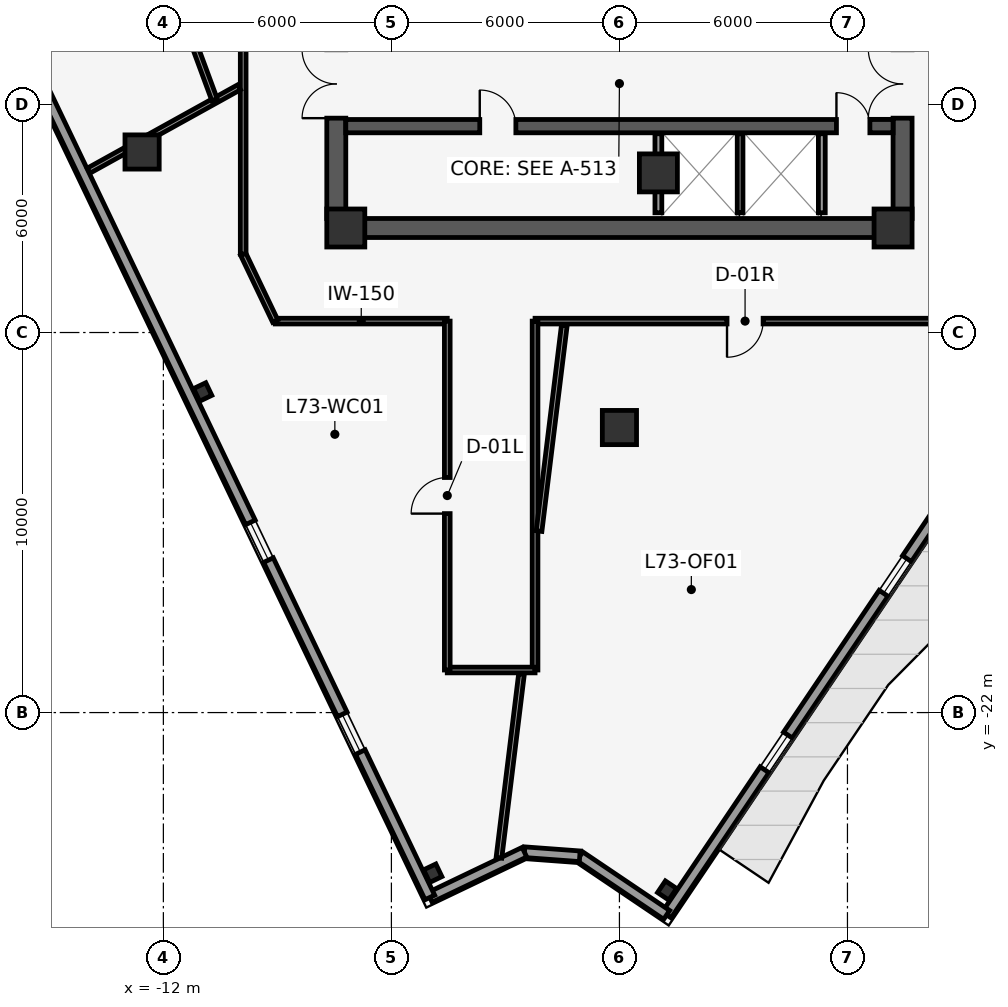
"""IFC4 building model, lengths in metres.
Left out: names, types, materials, properties, quantities, classifications, styles, units other than length and angle.
Written with IfcOpenShell. Run it as: python <this file> out.ifc"""

import sys

from ifc_helpers import new_model, si_unit, direction, frame, frame_2d, origin, origin_2d, place, context, subcontext, project, spatial, rectangle, i_section, extrude, element, fill, save


model = new_model("IFC4")
c1 = context("Model", 3, precision=1e-05, world=origin(), true_north=direction((0.0, 1.0)))
c2 = subcontext(c1, "Body", "Model", "MODEL_VIEW")
j1 = project(units=[si_unit("LENGTHUNIT", "METRE"), si_unit("PLANEANGLEUNIT", "RADIAN")], contexts=[c1])
p1 = place(None, origin())
s1 = spatial("IfcSite", under=j1, at=p1, CompositionType="ELEMENT")
p2 = place(p1, origin())
s2 = spatial("IfcBuilding", under=s1, at=p2, CompositionType="ELEMENT")
p3 = place(p2, frame((0.0, 0.0, 310.6)))
s3 = spatial("IfcBuildingStorey", under=s2, at=p3, CompositionType="ELEMENT", Elevation=310.6)
p4 = place(p3, frame((-7.45, -9.0, 0.0), z_axis=(0.0, 0.0, 1.0), x_axis=(0.0, 1.0, 0.0)))
e1 = element("IfcWall", 1, at=p4, inside=s3, PredefinedType="SHEAR", context=c2, shape_type="SweptSolid", body=[
    extrude(rectangle(XDim=9.1, YDim=0.5, at=frame_2d((4.55, 0.0))), origin(), (0.0, 0.0, 1.0), 3.85),
])
p5 = place(p4, frame((2.64, 0.0, 0.0)))
e2 = element("IfcOpeningElement", 2, at=p5, cuts=e1, PredefinedType="OPENING", context=c2, shape_type="SweptSolid", body=[
    extrude(rectangle(XDim=1.8, YDim=2.2, at=frame_2d((0.9, 1.1))), frame((0.0, 0.26, 0.0), z_axis=(0.0, -1.0, 0.0), x_axis=(1.0, 0.0, 0.0)), (0.0, 0.0, 1.0), 0.52),
])
p6 = place(p4, frame((7.55, 0.0, 0.0)))
e3 = element("IfcOpeningElement", 3, at=p6, cuts=e1, PredefinedType="OPENING", context=c2, shape_type="SweptSolid", body=[
    extrude(rectangle(XDim=1.2, YDim=2.15, at=frame_2d((0.6, 1.075))), frame((0.0, 0.26, 0.0), z_axis=(0.0, -1.0, 0.0), x_axis=(1.0, 0.0, 0.0)), (0.0, 0.0, 1.0), 0.52),
])
p7 = place(p3, frame((7.45, -9.0, 0.0), z_axis=(0.0, 0.0, 1.0), x_axis=(0.0, 1.0, 0.0)))
e4 = element("IfcWall", 4, at=p7, inside=s3, PredefinedType="SHEAR", context=c2, shape_type="SweptSolid", body=[
    extrude(rectangle(XDim=9.1, YDim=0.5, at=frame_2d((4.55, 0.0))), origin(), (0.0, 0.0, 1.0), 3.85),
])
p8 = place(p7, frame((2.64, 0.0, 0.0)))
e5 = element("IfcOpeningElement", 5, at=p8, cuts=e4, PredefinedType="OPENING", context=c2, shape_type="SweptSolid", body=[
    extrude(rectangle(XDim=1.8, YDim=2.2, at=frame_2d((0.9, 1.1))), frame((0.0, 0.26, 0.0), z_axis=(0.0, -1.0, 0.0), x_axis=(1.0, 0.0, 0.0)), (0.0, 0.0, 1.0), 0.52),
])
p9 = place(p7, frame((7.55, 0.0, 0.0)))
e6 = element("IfcOpeningElement", 6, at=p9, cuts=e4, PredefinedType="OPENING", context=c2, shape_type="SweptSolid", body=[
    extrude(rectangle(XDim=1.2, YDim=2.15, at=frame_2d((0.6, 1.075))), frame((0.0, 0.26, 0.0), z_axis=(0.0, -1.0, 0.0), x_axis=(1.0, 0.0, 0.0)), (0.0, 0.0, 1.0), 0.52),
])
p10 = place(p3, frame((-7.45, -9.25, 0.0), z_axis=(0.0, 0.0, 1.0), x_axis=(1.0, 0.0, 0.0)))
e7 = element("IfcWall", 7, at=p10, inside=s3, PredefinedType="SHEAR", context=c2, shape_type="SweptSolid", body=[
    extrude(rectangle(XDim=14.9, YDim=0.5, at=frame_2d((7.45, 0.0))), origin(), (0.0, 0.0, 1.0), 3.85),
])
p11 = place(p3, frame((-7.2, -6.57, 0.0), z_axis=(0.0, 0.0, 1.0), x_axis=(1.0, 0.0, 0.0)))
e8 = element("IfcWall", 8, at=p11, inside=s3, PredefinedType="SHEAR", context=c2, shape_type="SweptSolid", body=[
    extrude(rectangle(XDim=14.4, YDim=0.35, at=frame_2d((7.2, 0.0))), origin(), (0.0, 0.0, 1.0), 3.85),
])
p12 = place(p11, frame((3.525, 0.0, 0.0)))
e9 = element("IfcOpeningElement", 9, at=p12, cuts=e8, PredefinedType="OPENING", context=c2, shape_type="SweptSolid", body=[
    extrude(rectangle(XDim=0.95, YDim=2.15, at=frame_2d((0.475, 1.075))), frame((0.0, 0.185, 0.0), z_axis=(0.0, -1.0, 0.0), x_axis=(1.0, 0.0, 0.0)), (0.0, 0.0, 1.0), 0.37),
])
p13 = place(p11, frame((12.91, 0.0, 0.0)))
e10 = element("IfcOpeningElement", 10, at=p13, cuts=e8, PredefinedType="OPENING", context=c2, shape_type="SweptSolid", body=[
    extrude(rectangle(XDim=0.88, YDim=2.15, at=frame_2d((0.44, 1.075))), frame((0.0, 0.185, 0.0), z_axis=(0.0, -1.0, 0.0), x_axis=(1.0, 0.0, 0.0)), (0.0, 0.0, 1.0), 0.37),
])
for number, where, z_axis, x_axis in (
    (11, (-7.2, -9.25, 0.0), (0.0, 0.0, 1.0), (1.0, 0.0, 0.0)),
    (12, (7.2, -9.25, 0.0), (0.0, 0.0, 1.0), (1.0, 0.0, 0.0)),
    (13, (1.025, -7.8, 0.0), (0.0, 0.0, 1.0), (1.0, 0.0, 0.0)),
):
    element("IfcColumn", number, at=place(p3, frame(where, z_axis=z_axis, x_axis=x_axis)), inside=s3, PredefinedType="COLUMN", context=c2, shape_type="SweptSolid", body=[
        extrude(rectangle(XDim=1.0, YDim=1.0, at=origin_2d()), origin(), (0.0, 0.0, 1.0), 4.1),
    ])
for number, where, z_axis, x_axis in (
    (14, (-12.56, -7.25, 0.0), (0.0, 0.0, 1.0), (1.0, 0.0, 0.0)),
    (15, (0.0, -14.5, 0.0), (0.0, 0.0, 1.0), (1.0, 0.0, 0.0)),
):
    element("IfcColumn", number, at=place(p3, frame(where, z_axis=z_axis, x_axis=x_axis)), inside=s3, PredefinedType="COLUMN", context=c2, shape_type="SweptSolid", body=[
        extrude(rectangle(XDim=0.9, YDim=0.9, at=origin_2d()), origin(), (0.0, 0.0, 1.0), 4.1),
    ])
for number, where, z_axis, x_axis in (
    (16, (-10.966, -13.565, 0.0), (0.0, 0.0, 1.0), (-0.431, 0.902, 0.0)),
    (17, (-4.912, -26.227, 0.0), (0.0, 0.0, 1.0), (-0.431, 0.902, 0.0)),
    (18, (1.254, -26.682, 0.0), (0.0, 0.0, 1.0), (0.559, 0.829, 0.0)),
):
    element("IfcColumn", number, at=place(p3, frame(where, z_axis=z_axis, x_axis=x_axis)), inside=s3, PredefinedType="COLUMN", context=c2, shape_type="SweptSolid", body=[
        extrude(i_section(OverallWidth=0.368, OverallDepth=0.356, WebThickness=0.011, FlangeThickness=0.018, at=origin_2d()), origin(), (0.0, 0.0, 1.0), 4.1),
    ])
p14 = place(p3, frame((25.8, 9.083, 0.0), z_axis=(0.0, 0.0, 1.0), x_axis=(-0.55919392155, -0.829036885851, 0.0)))
e19 = element("IfcWall", 19, at=p14, inside=s3, PredefinedType="STANDARD", context=c2, shape_type="SweptSolid", body=[
    extrude(rectangle(XDim=43.915, YDim=0.28, at=frame_2d((21.958, 0.0))), origin(), (0.0, 0.0, 1.0), 3.85),
])
p15 = place(p14, frame((21.457, 0.0, 0.0)))
e20 = element("IfcOpeningElement", 20, at=p15, cuts=e19, PredefinedType="OPENING", context=c2, shape_type="SweptSolid", body=[
    extrude(rectangle(XDim=1.0, YDim=2.15, at=frame_2d((0.5, 1.075))), frame((0.0, 0.15, 0.0), z_axis=(0.0, -1.0, 0.0), x_axis=(1.0, 0.0, 0.0)), (0.0, 0.0, 1.0), 0.3),
])
p16 = place(p14, frame((4.607, 0.0, 0.85)))
e21 = element("IfcOpeningElement", 21, at=p16, cuts=e19, PredefinedType="OPENING", context=c2, shape_type="SweptSolid", body=[
    extrude(rectangle(XDim=1.1, YDim=2.15, at=frame_2d((0.55, 1.075))), frame((0.0, 0.15, 0.0), z_axis=(0.0, -1.0, 0.0), x_axis=(1.0, 0.0, 0.0)), (0.0, 0.0, 1.0), 0.3),
])
p17 = place(p14, frame((15.807, 0.0, 0.85)))
e22 = element("IfcOpeningElement", 22, at=p17, cuts=e19, PredefinedType="OPENING", context=c2, shape_type="SweptSolid", body=[
    extrude(rectangle(XDim=1.1, YDim=2.15, at=frame_2d((0.55, 1.075))), frame((0.0, 0.15, 0.0), z_axis=(0.0, -1.0, 0.0), x_axis=(1.0, 0.0, 0.0)), (0.0, 0.0, 1.0), 0.3),
])
p18 = place(p14, frame((27.007, 0.0, 0.85)))
e23 = element("IfcOpeningElement", 23, at=p18, cuts=e19, PredefinedType="OPENING", context=c2, shape_type="SweptSolid", body=[
    extrude(rectangle(XDim=1.1, YDim=2.15, at=frame_2d((0.55, 1.075))), frame((0.0, 0.15, 0.0), z_axis=(0.0, -1.0, 0.0), x_axis=(1.0, 0.0, 0.0)), (0.0, 0.0, 1.0), 0.3),
])
p19 = place(p14, frame((32.607, 0.0, 0.85)))
e24 = element("IfcOpeningElement", 24, at=p19, cuts=e19, PredefinedType="OPENING", context=c2, shape_type="SweptSolid", body=[
    extrude(rectangle(XDim=1.1, YDim=2.15, at=frame_2d((0.55, 1.075))), frame((0.0, 0.15, 0.0), z_axis=(0.0, -1.0, 0.0), x_axis=(1.0, 0.0, 0.0)), (0.0, 0.0, 1.0), 0.3),
])
p20 = place(p14, frame((38.207, 0.0, 0.85)))
e25 = element("IfcOpeningElement", 25, at=p20, cuts=e19, PredefinedType="OPENING", context=c2, shape_type="SweptSolid", body=[
    extrude(rectangle(XDim=1.1, YDim=2.15, at=frame_2d((0.55, 1.075))), frame((0.0, 0.15, 0.0), z_axis=(0.0, -1.0, 0.0), x_axis=(1.0, 0.0, 0.0)), (0.0, 0.0, 1.0), 0.3),
])
p21 = place(p3, frame((1.243, -27.324, 0.0), z_axis=(0.0, 0.0, 1.0), x_axis=(-0.829015842911, 0.559225117643, 0.0)))
e26 = element("IfcWall", 26, at=p21, inside=s3, PredefinedType="STANDARD", context=c2, shape_type="SweptSolid", body=[
    extrude(rectangle(XDim=2.759, YDim=0.28, at=frame_2d((1.379, 0.0))), origin(), (0.0, 0.0, 1.0), 3.85),
])
p22 = place(p3, frame((-1.044, -25.781, 0.0), z_axis=(0.0, 0.0, 1.0), x_axis=(-0.997286893261, 0.073612855735, 0.0)))
e27 = element("IfcWall", 27, at=p22, inside=s3, PredefinedType="STANDARD", context=c2, shape_type="SweptSolid", body=[
    extrude(rectangle(XDim=1.459, YDim=0.28, at=frame_2d((0.729, 0.0))), origin(), (0.0, 0.0, 1.0), 3.85),
])
p23 = place(p3, frame((-2.5, -25.674, 0.0), z_axis=(0.0, 0.0, 1.0), x_axis=(-0.902044352952, -0.431643354296, 0.0)))
e28 = element("IfcWall", 28, at=p23, inside=s3, PredefinedType="STANDARD", context=c2, shape_type="SweptSolid", body=[
    extrude(rectangle(XDim=2.759, YDim=0.28, at=frame_2d((1.379, 0.0))), origin(), (0.0, 0.0, 1.0), 3.85),
])
p24 = place(p3, frame((-4.988, -26.865, 0.0), z_axis=(0.0, 0.0, 1.0), x_axis=(-0.431592936847, 0.902068476815, 0.0)))
e29 = element("IfcWall", 29, at=p24, inside=s3, PredefinedType="STANDARD", context=c2, shape_type="SweptSolid", body=[
    extrude(rectangle(XDim=43.18, YDim=0.28, at=frame_2d((21.59, 0.0))), origin(), (0.0, 0.0, 1.0), 3.85),
])
p25 = place(p24, frame((4.24, 0.0, 0.85)))
e30 = element("IfcOpeningElement", 30, at=p25, cuts=e29, PredefinedType="OPENING", context=c2, shape_type="SweptSolid", body=[
    extrude(rectangle(XDim=1.1, YDim=2.15, at=frame_2d((0.55, 1.075))), frame((0.0, 0.15, 0.0), z_axis=(0.0, -1.0, 0.0), x_axis=(1.0, 0.0, 0.0)), (0.0, 0.0, 1.0), 0.3),
])
p26 = place(p24, frame((9.84, 0.0, 0.85)))
e31 = element("IfcOpeningElement", 31, at=p26, cuts=e29, PredefinedType="OPENING", context=c2, shape_type="SweptSolid", body=[
    extrude(rectangle(XDim=1.1, YDim=2.15, at=frame_2d((0.55, 1.075))), frame((0.0, 0.15, 0.0), z_axis=(0.0, -1.0, 0.0), x_axis=(1.0, 0.0, 0.0)), (0.0, 0.0, 1.0), 0.3),
])
p27 = place(p24, frame((32.24, 0.0, 0.85)))
e32 = element("IfcOpeningElement", 32, at=p27, cuts=e29, PredefinedType="OPENING", context=c2, shape_type="SweptSolid", body=[
    extrude(rectangle(XDim=1.1, YDim=2.15, at=frame_2d((0.55, 1.075))), frame((0.0, 0.15, 0.0), z_axis=(0.0, -1.0, 0.0), x_axis=(1.0, 0.0, 0.0)), (0.0, 0.0, 1.0), 0.3),
])
p28 = place(p24, frame((37.84, 0.0, 0.85)))
e33 = element("IfcOpeningElement", 33, at=p28, cuts=e29, PredefinedType="OPENING", context=c2, shape_type="SweptSolid", body=[
    extrude(rectangle(XDim=1.1, YDim=2.15, at=frame_2d((0.55, 1.075))), frame((0.0, 0.15, 0.0), z_axis=(0.0, -1.0, 0.0), x_axis=(1.0, 0.0, 0.0)), (0.0, 0.0, 1.0), 0.3),
])
p29 = place(p3, frame((1.025, -8.85, 0.0), z_axis=(0.0, 0.0, 1.0), x_axis=(0.0, 1.0, 0.0)))
e34 = element("IfcWall", 34, at=p29, inside=s3, PredefinedType="PARTITIONING", context=c2, shape_type="SweptSolid", body=[
    extrude(rectangle(XDim=2.08, YDim=0.18, at=frame_2d((1.04, 0.0))), origin(), (0.0, 0.0, 1.0), 2.898),
])
p30 = place(p3, frame((3.175, -8.85, 0.0), z_axis=(0.0, 0.0, 1.0), x_axis=(0.0, 1.0, 0.0)))
e35 = element("IfcWall", 35, at=p30, inside=s3, PredefinedType="PARTITIONING", context=c2, shape_type="SweptSolid", body=[
    extrude(rectangle(XDim=2.08, YDim=0.15, at=frame_2d((1.04, 0.0))), origin(), (0.0, 0.0, 1.0), 3.85),
])
p31 = place(p3, frame((5.325, -8.85, 0.0), z_axis=(0.0, 0.0, 1.0), x_axis=(0.0, 1.0, 0.0)))
e36 = element("IfcWall", 36, at=p31, inside=s3, PredefinedType="PARTITIONING", context=c2, shape_type="SweptSolid", body=[
    extrude(rectangle(XDim=2.08, YDim=0.18, at=frame_2d((1.04, 0.0))), origin(), (0.0, 0.0, 1.0), 3.85),
])
p32 = place(p3, frame((-4.53, -11.7, 0.0), z_axis=(0.0, 0.0, 1.0), x_axis=(-1.0, 0.0, 0.0)))
e37 = element("IfcWall", 37, at=p32, inside=s3, PredefinedType="PARTITIONING", context=c2, shape_type="SweptSolid", body=[
    extrude(rectangle(XDim=4.526, YDim=0.15, at=frame_2d((2.263, 0.0))), origin(), (0.0, 0.0, 1.0), 3.85),
])
p33 = place(p3, frame((-9.056, -11.7, 0.0), z_axis=(0.0, 0.0, 1.0), x_axis=(-0.431605782187, 0.902062330875, 0.0)))
e38 = element("IfcWall", 38, at=p33, inside=s3, PredefinedType="PARTITIONING", context=c2, shape_type="SweptSolid", body=[
    extrude(rectangle(XDim=1.954, YDim=0.15, at=frame_2d((0.977, 0.0))), origin(), (0.0, 0.0, 1.0), 3.85),
])
p34 = place(p3, frame((-9.9, -9.937, 0.0), z_axis=(0.0, 0.0, 1.0), x_axis=(0.0, 1.0, 0.0)))
e39 = element("IfcWall", 39, at=p34, inside=s3, PredefinedType="PARTITIONING", context=c2, shape_type="SweptSolid", body=[
    extrude(rectangle(XDim=21.787, YDim=0.15, at=frame_2d((10.894, 0.0))), origin(), (0.0, 0.0, 1.0), 3.85),
])
p35 = place(p34, frame((17.591, 0.0, 0.0)))
e40 = element("IfcOpeningElement", 40, at=p35, cuts=e39, PredefinedType="OPENING", context=c2, shape_type="SweptSolid", body=[
    extrude(rectangle(XDim=0.95, YDim=2.15, at=frame_2d((0.475, 1.075))), frame((0.0, 0.085, 0.0), z_axis=(0.0, -1.0, 0.0), x_axis=(1.0, 0.0, 0.0)), (0.0, 0.0, 1.0), 0.17),
])
p36 = place(p34, frame((9.022, 0.0, 0.0)))
e41 = element("IfcOpeningElement", 41, at=p36, cuts=e39, PredefinedType="OPENING", context=c2, shape_type="SweptSolid", body=[
    extrude(rectangle(XDim=0.95, YDim=2.15, at=frame_2d((0.475, 1.075))), frame((0.0, 0.085, 0.0), z_axis=(0.0, -1.0, 0.0), x_axis=(1.0, 0.0, 0.0)), (0.0, 0.0, 1.0), 0.17),
])
p37 = place(p3, frame((8.314, -11.7, 0.0), z_axis=(0.0, 0.0, 1.0), x_axis=(-1.0, 0.0, 0.0)))
e42 = element("IfcWall", 42, at=p37, inside=s3, PredefinedType="PARTITIONING", context=c2, shape_type="SweptSolid", body=[
    extrude(rectangle(XDim=10.534, YDim=0.15, at=frame_2d((5.267, 0.0))), origin(), (0.0, 0.0, 1.0), 3.85),
])
p38 = place(p37, frame((4.533, 0.0, 0.0)))
e43 = element("IfcOpeningElement", 43, at=p38, cuts=e42, PredefinedType="OPENING", context=c2, shape_type="SweptSolid", body=[
    extrude(rectangle(XDim=0.95, YDim=2.15, at=frame_2d((0.475, 1.075))), frame((0.0, 0.085, 0.0), z_axis=(0.0, -1.0, 0.0), x_axis=(1.0, 0.0, 0.0)), (0.0, 0.0, 1.0), 0.17),
])
p39 = place(p3, frame((-2.22, -11.7, 0.0), z_axis=(0.0, 0.0, 1.0), x_axis=(0.0, -1.0, 0.0)))
e44 = element("IfcWall", 44, at=p39, inside=s3, PredefinedType="PARTITIONING", context=c2, shape_type="SweptSolid", body=[
    extrude(rectangle(XDim=9.18, YDim=0.15, at=frame_2d((4.59, 0.0))), origin(), (0.0, 0.0, 1.0), 3.85),
])
p40 = place(p3, frame((-2.22, -20.88, 0.0), z_axis=(0.0, 0.0, 1.0), x_axis=(-1.0, 0.0, 0.0)))
e45 = element("IfcWall", 45, at=p40, inside=s3, PredefinedType="PARTITIONING", context=c2, shape_type="SweptSolid", body=[
    extrude(rectangle(XDim=2.31, YDim=0.15, at=frame_2d((1.155, 0.0))), origin(), (0.0, 0.0, 1.0), 3.85),
])
p41 = place(p3, frame((-4.53, -20.88, 0.0), z_axis=(0.0, 0.0, 1.0), x_axis=(0.0, 1.0, 0.0)))
e46 = element("IfcWall", 46, at=p41, inside=s3, PredefinedType="PARTITIONING", context=c2, shape_type="SweptSolid", body=[
    extrude(rectangle(XDim=9.18, YDim=0.15, at=frame_2d((4.59, 0.0))), origin(), (0.0, 0.0, 1.0), 3.85),
])
p42 = place(p41, frame((4.115, 0.0, 0.0)))
e47 = element("IfcOpeningElement", 47, at=p42, cuts=e46, PredefinedType="OPENING", context=c2, shape_type="SweptSolid", body=[
    extrude(rectangle(XDim=0.95, YDim=2.15, at=frame_2d((0.475, 1.075))), frame((0.0, 0.085, 0.0), z_axis=(0.0, -1.0, 0.0), x_axis=(1.0, 0.0, 0.0)), (0.0, 0.0, 1.0), 0.17),
])
p43 = place(p3, frame((-10.005, -5.546, 0.0), z_axis=(0.0, 0.0, 1.0), x_axis=(-0.874622222754, -0.48480508193, 0.0)))
e48 = element("IfcWall", 48, at=p43, inside=s3, PredefinedType="PARTITIONING", context=c2, shape_type="SweptSolid", body=[
    extrude(rectangle(XDim=4.529, YDim=0.15, at=frame_2d((2.264, 0.0))), origin(), (0.0, 0.0, 1.0), 3.85),
])
p44 = place(p3, frame((-1.449, -11.805, 0.0), z_axis=(0.0, 0.0, 1.0), x_axis=(-0.121866576679, -0.992546491349, 0.0)))
e49 = element("IfcWall", 49, at=p44, inside=s3, PredefinedType="PARTITIONING", context=c2, shape_type="SweptSolid", body=[
    extrude(rectangle(XDim=5.461, YDim=0.15, at=frame_2d((2.73, 0.0))), origin(), (0.0, 0.0, 1.0), 3.85),
])
p45 = place(p3, frame((-2.577, -20.985, 0.0), z_axis=(0.0, 0.0, 1.0), x_axis=(-0.12186446529, -0.992546750586, 0.0)))
e50 = element("IfcWall", 50, at=p45, inside=s3, PredefinedType="PARTITIONING", context=c2, shape_type="SweptSolid", body=[
    extrude(rectangle(XDim=4.874, YDim=0.15, at=frame_2d((2.437, 0.0))), origin(), (0.0, 0.0, 1.0), 3.85),
])
p46 = place(p3, frame((-15.473, 7.188, 0.0), z_axis=(0.0, 0.0, 1.0), x_axis=(0.346159492737, -0.938175679491, 0.0)))
e51 = element("IfcWall", 51, at=p46, inside=s3, PredefinedType="PARTITIONING", context=c2, shape_type="SweptSolid", body=[
    extrude(rectangle(XDim=13.925, YDim=0.15, at=frame_2d((6.962, 0.0))), origin(), (0.0, 0.0, 1.0), 3.85),
])
p47 = place(p46, frame((6.512, 0.0, 0.0)))
e52 = element("IfcOpeningElement", 52, at=p47, cuts=e51, PredefinedType="OPENING", context=c2, shape_type="SweptSolid", body=[
    extrude(rectangle(XDim=0.9, YDim=2.1, at=frame_2d((0.45, 1.05))), frame((0.0, 0.085, 0.0), z_axis=(0.0, -1.0, 0.0), x_axis=(1.0, 0.0, 0.0)), (0.0, 0.0, 1.0), 0.17),
])
p48 = place(p19, origin())
e53 = element("IfcWindow", 53, at=p48, inside=s3, PartitioningType="SINGLE_PANEL", PredefinedType="WINDOW", context=c2, shape_type="SweptSolid", body=[
    extrude(rectangle(XDim=1.1, YDim=2.15, at=frame_2d((0.55, 1.075))), frame((0.0, 0.03, 0.0), z_axis=(0.0, -1.0, 0.0), x_axis=(1.0, 0.0, 0.0)), (0.0, 0.0, 1.0), 0.06),
])
fill(e24, e53)
p49 = place(p20, origin())
e54 = element("IfcWindow", 54, at=p49, inside=s3, PartitioningType="SINGLE_PANEL", PredefinedType="WINDOW", context=c2, shape_type="SweptSolid", body=[
    extrude(rectangle(XDim=1.1, YDim=2.15, at=frame_2d((0.55, 1.075))), frame((0.0, 0.03, 0.0), z_axis=(0.0, -1.0, 0.0), x_axis=(1.0, 0.0, 0.0)), (0.0, 0.0, 1.0), 0.06),
])
fill(e25, e54)
p50 = place(p25, origin())
e55 = element("IfcWindow", 55, at=p50, inside=s3, PartitioningType="SINGLE_PANEL", PredefinedType="WINDOW", context=c2, shape_type="SweptSolid", body=[
    extrude(rectangle(XDim=1.1, YDim=2.15, at=frame_2d((0.55, 1.075))), frame((0.0, 0.03, 0.0), z_axis=(0.0, -1.0, 0.0), x_axis=(1.0, 0.0, 0.0)), (0.0, 0.0, 1.0), 0.06),
])
fill(e30, e55)
p51 = place(p26, origin())
e56 = element("IfcWindow", 56, at=p51, inside=s3, PartitioningType="SINGLE_PANEL", PredefinedType="WINDOW", context=c2, shape_type="SweptSolid", body=[
    extrude(rectangle(XDim=1.1, YDim=2.15, at=frame_2d((0.55, 1.075))), frame((0.0, 0.03, 0.0), z_axis=(0.0, -1.0, 0.0), x_axis=(1.0, 0.0, 0.0)), (0.0, 0.0, 1.0), 0.06),
])
fill(e31, e56)
p52 = place(p5, origin())
e57 = element("IfcDoor", 57, at=p52, inside=s3, OperationType="DOUBLE_DOOR_SINGLE_SWING", PredefinedType="DOOR", context=c2, shape_type="SweptSolid", body=[
    extrude(rectangle(XDim=1.8, YDim=2.2, at=frame_2d((0.9, 1.1))), frame((0.0, 0.025, 0.0), z_axis=(0.0, -1.0, 0.0), x_axis=(1.0, 0.0, 0.0)), (0.0, 0.0, 1.0), 0.05),
])
fill(e2, e57)
p53 = place(p8, origin())
e58 = element("IfcDoor", 58, at=p53, inside=s3, OperationType="DOUBLE_DOOR_SINGLE_SWING", PredefinedType="DOOR", context=c2, shape_type="SweptSolid", body=[
    extrude(rectangle(XDim=1.8, YDim=2.2, at=frame_2d((0.9, 1.1))), frame((0.0, 0.025, 0.0), z_axis=(0.0, -1.0, 0.0), x_axis=(1.0, 0.0, 0.0)), (0.0, 0.0, 1.0), 0.05),
])
fill(e5, e58)
p54 = place(p12, origin())
e59 = element("IfcDoor", 59, at=p54, inside=s3, OperationType="SINGLE_SWING_LEFT", PredefinedType="DOOR", context=c2, shape_type="SweptSolid", body=[
    extrude(rectangle(XDim=0.95, YDim=2.15, at=frame_2d((0.475, 1.075))), frame((0.0, 0.025, 0.0), z_axis=(0.0, -1.0, 0.0), x_axis=(1.0, 0.0, 0.0)), (0.0, 0.0, 1.0), 0.05),
])
fill(e9, e59)
p55 = place(p13, origin())
e60 = element("IfcDoor", 60, at=p55, inside=s3, OperationType="SINGLE_SWING_LEFT", PredefinedType="DOOR", context=c2, shape_type="SweptSolid", body=[
    extrude(rectangle(XDim=0.88, YDim=2.15, at=frame_2d((0.44, 1.075))), frame((0.0, 0.025, 0.0), z_axis=(0.0, -1.0, 0.0), x_axis=(1.0, 0.0, 0.0)), (0.0, 0.0, 1.0), 0.05),
])
fill(e10, e60)
p56 = place(p42, origin())
e61 = element("IfcDoor", 61, at=p56, inside=s3, OperationType="SINGLE_SWING_LEFT", PredefinedType="DOOR", context=c2, shape_type="SweptSolid", body=[
    extrude(rectangle(XDim=0.95, YDim=2.15, at=frame_2d((0.475, 1.075))), frame((0.0, 0.025, 0.0), z_axis=(0.0, -1.0, 0.0), x_axis=(1.0, 0.0, 0.0)), (0.0, 0.0, 1.0), 0.05),
])
fill(e47, e61)
p57 = place(p38, origin())
e62 = element("IfcDoor", 62, at=p57, inside=s3, OperationType="SINGLE_SWING_RIGHT", PredefinedType="DOOR", context=c2, shape_type="SweptSolid", body=[
    extrude(rectangle(XDim=0.95, YDim=2.15, at=frame_2d((0.475, 1.075))), frame((0.0, 0.025, 0.0), z_axis=(0.0, -1.0, 0.0), x_axis=(1.0, 0.0, 0.0)), (0.0, 0.0, 1.0), 0.05),
])
fill(e43, e62)
save(model, sys.argv[1])
